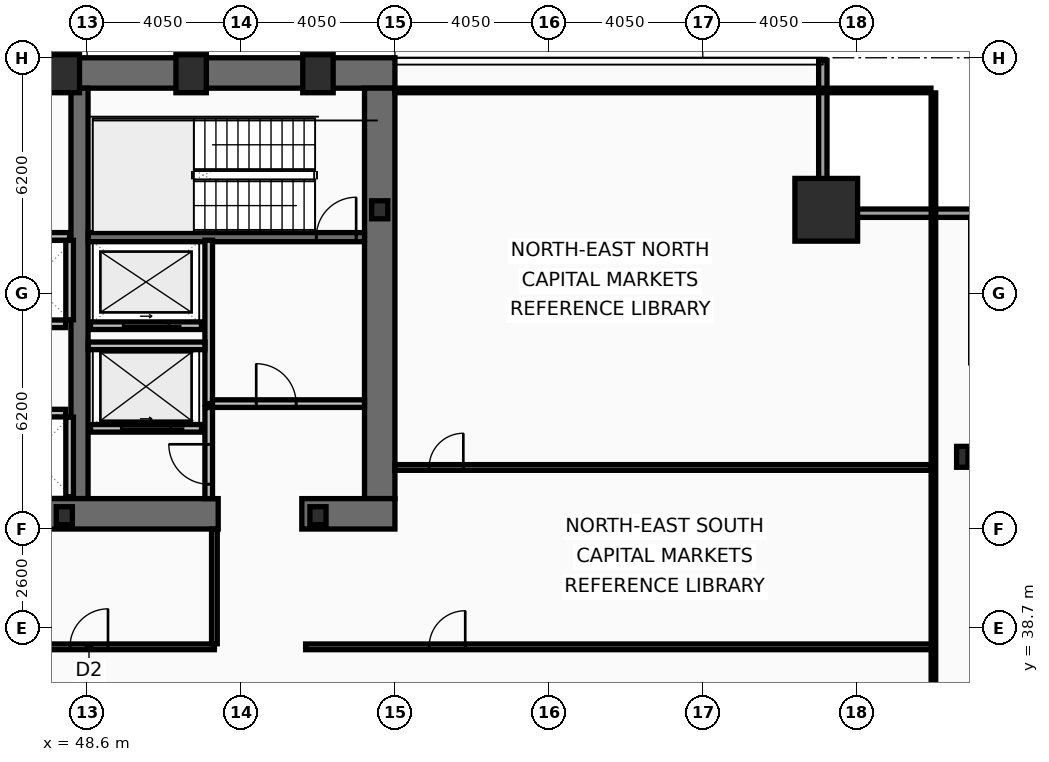
"""IFC4 building model, lengths in metres.
Left out: names, types, materials, properties, quantities, classifications, styles, units other than length and angle.
Written with IfcOpenShell. Run it as: python <this file> out.ifc"""

import sys

from ifc_helpers import new_model, si_unit, direction, frame, frame_2d, origin, origin_2d, place, context, subcontext, project, spatial, rectangle, hollow_rectangle, i_section, extrude, element, fill, save


model = new_model("IFC4")
c1 = context("Model", 3, precision=1e-05, world=origin(), true_north=direction((0.0, 1.0)))
c2 = subcontext(c1, "Body", "Model", "MODEL_VIEW")
j1 = project(units=[si_unit("LENGTHUNIT", "METRE"), si_unit("PLANEANGLEUNIT", "RADIAN")], contexts=[c1])
p1 = place(None, origin())
s1 = spatial("IfcSite", under=j1, at=p1, CompositionType="ELEMENT")
p2 = place(p1, origin())
s2 = spatial("IfcBuilding", under=s1, at=p2, CompositionType="ELEMENT")
p3 = place(p2, frame((0.0, 0.0, 57.8)))
s3 = spatial("IfcBuildingStorey", under=s2, at=p3, CompositionType="ELEMENT", Elevation=57.8)
p4 = place(p3, frame((16.2, 53.3, 0.0), z_axis=(0.0, 0.0, 1.0), x_axis=(1.0, 0.0, 0.0)))
e1 = element("IfcWall", 1, at=p4, inside=s3, PredefinedType="SHEAR", context=c2, shape_type="SweptSolid", body=[
    extrude(rectangle(XDim=40.5, YDim=0.8, at=frame_2d((20.25, 0.0))), origin(), (0.0, 0.0, 1.0), 3.82),
])
p5 = place(p3, frame((56.3, 52.9, 0.0), z_axis=(0.0, 0.0, 1.0), x_axis=(0.0, -1.0, 0.0)))
e2 = element("IfcWall", 2, at=p5, inside=s3, PredefinedType="SHEAR", context=c2, shape_type="SweptSolid", body=[
    extrude(rectangle(XDim=10.8, YDim=0.8, at=frame_2d((5.4, 0.0))), origin(), (0.0, 0.0, 1.0), 3.82),
])
p6 = place(p3, frame((48.4, 42.1, 0.0), z_axis=(0.0, 0.0, 1.0), x_axis=(0.0, 1.0, 0.0)))
e3 = element("IfcWall", 3, at=p6, inside=s3, PredefinedType="SHEAR", context=c2, shape_type="SweptSolid", body=[
    extrude(rectangle(XDim=10.8, YDim=0.45, at=frame_2d((5.4, 0.0))), origin(), (0.0, 0.0, 1.0), 3.82),
])
p7 = place(p3, frame((52.05, 41.7, 0.0), z_axis=(0.0, 0.0, 1.0), x_axis=(-1.0, 0.0, 0.0)))
e4 = element("IfcWall", 4, at=p7, inside=s3, PredefinedType="SHEAR", context=c2, shape_type="SweptSolid", body=[
    extrude(rectangle(XDim=11.3, YDim=0.8, at=frame_2d((5.65, 0.0))), origin(), (0.0, 0.0, 1.0), 3.82),
])
p8 = place(p3, frame((56.7, 41.7, 0.0), z_axis=(0.0, 0.0, 1.0), x_axis=(-1.0, 0.0, 0.0)))
e5 = element("IfcWall", 5, at=p8, inside=s3, PredefinedType="SHEAR", context=c2, shape_type="SweptSolid", body=[
    extrude(rectangle(XDim=2.45, YDim=0.8, at=frame_2d((1.225, 0.0))), origin(), (0.0, 0.0, 1.0), 3.82),
])
p9 = place(p3, frame((48.63, 48.98, 0.0), z_axis=(0.0, 0.0, 1.0), x_axis=(1.0, 0.0, 0.0)))
e6 = element("IfcWall", 6, at=p9, inside=s3, PredefinedType="SHEAR", context=c2, shape_type="SweptSolid", body=[
    extrude(rectangle(XDim=7.27, YDim=0.24, at=frame_2d((3.635, 0.0))), origin(), (0.0, 0.0, 1.0), 3.82),
])
p10 = place(p9, frame((6.0, 0.0, 0.0)))
e7 = element("IfcOpeningElement", 7, at=p10, cuts=e6, PredefinedType="OPENING", context=c2, shape_type="SweptSolid", body=[
    extrude(rectangle(XDim=1.05, YDim=2.15, at=frame_2d((0.525, 1.075))), frame((0.0, 0.13, 0.0), z_axis=(0.0, -1.0, 0.0), x_axis=(1.0, 0.0, 0.0)), (0.0, 0.0, 1.0), 0.26),
])
p11 = place(p3, frame((68.05, 49.7, 0.0), z_axis=(0.0, 0.0, 1.0), x_axis=(1.0, 0.0, 0.0)))
e8 = element("IfcColumn", 8, at=p11, inside=s3, PredefinedType="COLUMN", context=c2, shape_type="SweptSolid", body=[
    extrude(hollow_rectangle(XDim=1.65, YDim=1.65, WallThickness=0.075, at=origin_2d()), origin(), (0.0, 0.0, 1.0), 4.0),
])
for number, where, z_axis, x_axis in (
    (9, (48.0, 53.28, 0.0), (0.0, 0.0, 1.0), (1.0, 0.0, 0.0)),
    (10, (51.337, 53.28, 0.0), (0.0, 0.0, 1.0), (1.0, 0.0, 0.0)),
    (11, (54.675, 53.28, 0.0), (0.0, 0.0, 1.0), (1.0, 0.0, 0.0)),
):
    element("IfcColumn", number, at=place(p3, frame(where, z_axis=z_axis, x_axis=x_axis)), inside=s3, PredefinedType="COLUMN", context=c2, shape_type="SweptSolid", body=[
        extrude(hollow_rectangle(XDim=0.8, YDim=1.0, WallThickness=0.055, at=origin_2d()), origin(), (0.0, 0.0, 1.0), 4.0),
    ])
p12 = place(p3, frame((71.63, 43.2, 0.0), z_axis=(0.0, 0.0, 1.0), x_axis=(1.0, 0.0, 0.0)))
e12 = element("IfcColumn", 12, at=p12, inside=s3, PredefinedType="COLUMN", context=c2, shape_type="SweptSolid", body=[
    extrude(i_section(OverallWidth=0.3, OverallDepth=0.55, WebThickness=0.015, FlangeThickness=0.029, at=origin_2d()), origin(), (0.0, 0.0, 1.0), 4.0),
])
for number, where, z_axis, x_axis in (
    (13, (56.3, 49.7, 0.0), (0.0, 0.0, 1.0), (1.0, 0.0, 0.0)),
    (14, (48.0, 41.65, 0.0), (0.0, 0.0, 1.0), (1.0, 0.0, 0.0)),
    (15, (54.675, 41.65, 0.0), (0.0, 0.0, 1.0), (1.0, 0.0, 0.0)),
):
    element("IfcColumn", number, at=place(p3, frame(where, z_axis=z_axis, x_axis=x_axis)), inside=s3, PredefinedType="COLUMN", context=c2, shape_type="SweptSolid", body=[
        extrude(i_section(OverallWidth=0.424, OverallDepth=0.474, WebThickness=0.048, FlangeThickness=0.077, at=origin_2d()), origin(), (0.0, 0.0, 1.0), 4.0),
    ])
p13 = place(p3, frame((67.96, 53.63, 0.0), z_axis=(0.0, 0.0, 1.0), x_axis=(0.0, -1.0, 0.0)))
e16 = element("IfcWall", 16, at=p13, inside=s3, PredefinedType="SOLIDWALL", context=c2, shape_type="SweptSolid", body=[
    extrude(rectangle(XDim=3.91, YDim=0.22, at=frame_2d((1.955, 0.0))), origin(), (0.0, 0.0, 1.0), 3.16),
])
p14 = place(p3, frame((67.85, 49.61, 0.0), z_axis=(0.0, 0.0, 1.0), x_axis=(1.0, 0.0, 0.0)))
e17 = element("IfcWall", 17, at=p14, inside=s3, PredefinedType="SOLIDWALL", context=c2, shape_type="SweptSolid", body=[
    extrude(rectangle(XDim=4.22, YDim=0.22, at=frame_2d((2.11, 0.0))), origin(), (0.0, 0.0, 1.0), 3.16),
])
p15 = place(p3, frame((51.61, 43.95, 0.0), z_axis=(0.0, 0.0, 1.0), x_axis=(-1.0, 0.0, 0.0)))
e18 = element("IfcWall", 18, at=p15, inside=s3, PredefinedType="PARTITIONING", context=c2, shape_type="SweptSolid", body=[
    extrude(rectangle(XDim=2.92, YDim=0.2, at=frame_2d((1.46, 0.0))), origin(), (0.0, 0.0, 1.0), 3.82),
])
p16 = place(p15, frame((0.81, 0.0, 0.0)))
e19 = element("IfcOpeningElement", 19, at=p16, cuts=e18, PredefinedType="OPENING", context=c2, shape_type="SweptSolid", body=[
    extrude(rectangle(XDim=1.3, YDim=2.18, at=frame_2d((0.65, 1.09))), frame((0.0, 0.11, 0.0), z_axis=(0.0, -1.0, 0.0), x_axis=(1.0, 0.0, 0.0)), (0.0, 0.0, 1.0), 0.22),
])
p17 = place(p3, frame((51.61, 46.65, 0.0), z_axis=(0.0, 0.0, 1.0), x_axis=(-1.0, 0.0, 0.0)))
e20 = element("IfcWall", 20, at=p17, inside=s3, PredefinedType="PARTITIONING", context=c2, shape_type="SweptSolid", body=[
    extrude(rectangle(XDim=2.92, YDim=0.2, at=frame_2d((1.46, 0.0))), origin(), (0.0, 0.0, 1.0), 3.82),
])
p18 = place(p17, frame((0.86, 0.0, 0.0)))
e21 = element("IfcOpeningElement", 21, at=p18, cuts=e20, PredefinedType="OPENING", context=c2, shape_type="SweptSolid", body=[
    extrude(rectangle(XDim=1.2, YDim=2.18, at=frame_2d((0.6, 1.09))), frame((0.0, 0.11, 0.0), z_axis=(0.0, -1.0, 0.0), x_axis=(1.0, 0.0, 0.0)), (0.0, 0.0, 1.0), 0.22),
])
p19 = place(p3, frame((51.8, 44.6, 0.0), z_axis=(0.0, 0.0, 1.0), x_axis=(0.0, 1.0, 0.0)))
e22 = element("IfcWall", 22, at=p19, inside=s3, PredefinedType="PARTITIONING", context=c2, shape_type="SweptSolid", body=[
    extrude(rectangle(XDim=4.3, YDim=0.2, at=frame_2d((2.15, 0.0))), origin(), (0.0, 0.0, 1.0), 3.82),
])
p20 = place(p3, frame((51.9, 44.6, 0.0), z_axis=(0.0, 0.0, 1.0), x_axis=(1.0, 0.0, 0.0)))
e23 = element("IfcWall", 23, at=p20, inside=s3, PredefinedType="PARTITIONING", context=c2, shape_type="SweptSolid", body=[
    extrude(rectangle(XDim=4.0, YDim=0.2, at=frame_2d((2.0, 0.0))), origin(), (0.0, 0.0, 1.0), 3.82),
])
p21 = place(p20, frame((1.15, 0.0, 0.0)))
e24 = element("IfcOpeningElement", 24, at=p21, cuts=e23, PredefinedType="OPENING", context=c2, shape_type="SweptSolid", body=[
    extrude(rectangle(XDim=1.05, YDim=2.15, at=frame_2d((0.525, 1.075))), frame((0.0, 0.11, 0.0), z_axis=(0.0, -1.0, 0.0), x_axis=(1.0, 0.0, 0.0)), (0.0, 0.0, 1.0), 0.22),
])
p22 = place(p3, frame((48.63, 46.12, 0.0), z_axis=(0.0, 0.0, 1.0), x_axis=(1.0, 0.0, 0.0)))
e25 = element("IfcWall", 25, at=p22, inside=s3, PredefinedType="PARTITIONING", context=c2, shape_type="SweptSolid", body=[
    extrude(rectangle(XDim=3.07, YDim=0.2, at=frame_2d((1.535, 0.0))), origin(), (0.0, 0.0, 1.0), 3.82),
])
p23 = place(p3, frame((51.8, 42.1, 0.0), z_axis=(0.0, 0.0, 1.0), x_axis=(0.0, 1.0, 0.0)))
e26 = element("IfcWall", 26, at=p23, inside=s3, PredefinedType="PARTITIONING", context=c2, shape_type="SweptSolid", body=[
    extrude(rectangle(XDim=2.395, YDim=0.2, at=frame_2d((1.198, 0.0))), origin(), (0.0, 0.0, 1.0), 3.82),
])
p24 = place(p23, frame((0.38, 0.0, 0.0)))
e27 = element("IfcOpeningElement", 27, at=p24, cuts=e26, PredefinedType="OPENING", context=c2, shape_type="SweptSolid", body=[
    extrude(rectangle(XDim=1.05, YDim=2.15, at=frame_2d((0.525, 1.075))), frame((0.0, 0.11, 0.0), z_axis=(0.0, -1.0, 0.0), x_axis=(1.0, 0.0, 0.0)), (0.0, 0.0, 1.0), 0.22),
])
p25 = place(p3, frame((41.825, 46.7, 0.0), z_axis=(0.0, 0.0, 1.0), x_axis=(1.0, 0.0, 0.0)))
e28 = element("IfcWall", 28, at=p25, inside=s3, PredefinedType="PARTITIONING", context=c2, shape_type="SweptSolid", body=[
    extrude(rectangle(XDim=6.21, YDim=0.2, at=frame_2d((3.105, 0.0))), origin(), (0.0, 0.0, 1.0), 3.82),
])
p26 = place(p3, frame((48.14, 46.805, 0.0), z_axis=(0.0, 0.0, 1.0), x_axis=(0.0, 1.0, 0.0)))
e29 = element("IfcWall", 29, at=p26, inside=s3, PredefinedType="PARTITIONING", context=c2, shape_type="SweptSolid", body=[
    extrude(rectangle(XDim=2.09, YDim=0.2, at=frame_2d((1.045, 0.0))), origin(), (0.0, 0.0, 1.0), 3.82),
])
p27 = place(p3, frame((41.825, 44.35, 0.0), z_axis=(0.0, 0.0, 1.0), x_axis=(1.0, 0.0, 0.0)))
e30 = element("IfcWall", 30, at=p27, inside=s3, PredefinedType="PARTITIONING", context=c2, shape_type="SweptSolid", body=[
    extrude(rectangle(XDim=6.21, YDim=0.2, at=frame_2d((3.105, 0.0))), origin(), (0.0, 0.0, 1.0), 3.82),
])
p28 = place(p3, frame((48.14, 42.15, 0.0), z_axis=(0.0, 0.0, 1.0), x_axis=(0.0, 1.0, 0.0)))
e31 = element("IfcWall", 31, at=p28, inside=s3, PredefinedType="PARTITIONING", context=c2, shape_type="SweptSolid", body=[
    extrude(rectangle(XDim=2.095, YDim=0.2, at=frame_2d((1.048, 0.0))), origin(), (0.0, 0.0, 1.0), 3.82),
])
p29 = place(p3, frame((40.58, 52.86, 0.0), z_axis=(0.0, 0.0, 1.0), x_axis=(1.0, 0.0, 0.0)))
e32 = element("IfcWall", 32, at=p29, inside=s3, PredefinedType="PARTITIONING", context=c2, shape_type="SweptSolid", body=[
    extrude(rectangle(XDim=7.56, YDim=0.12, at=frame_2d((3.78, 0.0))), origin(), (0.0, 0.0, 1.0), 3.82),
])
p30 = place(p3, frame((40.58, 49.0, 0.0), z_axis=(0.0, 0.0, 1.0), x_axis=(1.0, 0.0, 0.0)))
e33 = element("IfcWall", 33, at=p30, inside=s3, PredefinedType="PARTITIONING", context=c2, shape_type="SweptSolid", body=[
    extrude(rectangle(XDim=7.56, YDim=0.2, at=frame_2d((3.78, 0.0))), origin(), (0.0, 0.0, 1.0), 3.82),
])
p31 = place(p30, frame((0.16, 0.0, 0.0)))
e34 = element("IfcOpeningElement", 34, at=p31, cuts=e33, PredefinedType="OPENING", context=c2, shape_type="SweptSolid", body=[
    extrude(rectangle(XDim=0.95, YDim=2.1, at=frame_2d((0.475, 1.05))), frame((0.0, 0.11, 0.0), z_axis=(0.0, -1.0, 0.0), x_axis=(1.0, 0.0, 0.0)), (0.0, 0.0, 1.0), 0.22),
])
p32 = place(p3, frame((47.05, 38.2, 0.0), z_axis=(0.0, 0.0, 1.0), x_axis=(1.0, 0.0, 0.0)))
e35 = element("IfcWall", 35, at=p32, inside=s3, PredefinedType="PARTITIONING", context=c2, shape_type="SweptSolid", body=[
    extrude(rectangle(XDim=4.9, YDim=0.15, at=frame_2d((2.45, 0.0))), origin(), (0.0, 0.0, 1.0), 3.01),
])
p33 = place(p32, frame((1.1, 0.0, 0.0)))
e36 = element("IfcOpeningElement", 36, at=p33, cuts=e35, PredefinedType="OPENING", context=c2, shape_type="SweptSolid", body=[
    extrude(rectangle(XDim=1.0, YDim=2.05, at=frame_2d((0.5, 1.025))), frame((0.0, 0.085, 0.0), z_axis=(0.0, -1.0, 0.0), x_axis=(1.0, 0.0, 0.0)), (0.0, 0.0, 1.0), 0.17),
])
p34 = place(p3, frame((51.95, 38.28, 0.0), z_axis=(0.0, 0.0, 1.0), x_axis=(0.0, 1.0, 0.0)))
e37 = element("IfcWall", 37, at=p34, inside=s3, PredefinedType="PARTITIONING", context=c2, shape_type="SweptSolid", body=[
    extrude(rectangle(XDim=3.02, YDim=0.15, at=frame_2d((1.51, 0.0))), origin(), (0.0, 0.0, 1.0), 3.82),
])
p35 = place(p3, frame((54.35, 38.2, 0.0), z_axis=(0.0, 0.0, 1.0), x_axis=(1.0, 0.0, 0.0)))
e38 = element("IfcWall", 38, at=p35, inside=s3, PredefinedType="PARTITIONING", context=c2, shape_type="SweptSolid", body=[
    extrude(rectangle(XDim=16.52, YDim=0.15, at=frame_2d((8.26, 0.0))), origin(), (0.0, 0.0, 1.0), 3.01),
])
p36 = place(p35, frame((3.25, 0.0, 0.0)))
e39 = element("IfcOpeningElement", 39, at=p36, cuts=e38, PredefinedType="OPENING", context=c2, shape_type="SweptSolid", body=[
    extrude(rectangle(XDim=0.95, YDim=2.05, at=frame_2d((0.475, 1.025))), frame((0.0, 0.085, 0.0), z_axis=(0.0, -1.0, 0.0), x_axis=(1.0, 0.0, 0.0)), (0.0, 0.0, 1.0), 0.17),
])
p37 = place(p3, frame((56.7, 42.92, 0.0), z_axis=(0.0, 0.0, 1.0), x_axis=(1.0, 0.0, 0.0)))
e40 = element("IfcWall", 40, at=p37, inside=s3, PredefinedType="PARTITIONING", context=c2, shape_type="SweptSolid", body=[
    extrude(rectangle(XDim=14.105, YDim=0.15, at=frame_2d((7.052, 0.0))), origin(), (0.0, 0.0, 1.0), 3.01),
])
p38 = place(p37, frame((0.9, 0.0, 0.0)))
e41 = element("IfcOpeningElement", 41, at=p38, cuts=e40, PredefinedType="OPENING", context=c2, shape_type="SweptSolid", body=[
    extrude(rectangle(XDim=0.9, YDim=2.05, at=frame_2d((0.45, 1.025))), frame((0.0, 0.085, 0.0), z_axis=(0.0, -1.0, 0.0), x_axis=(1.0, 0.0, 0.0)), (0.0, 0.0, 1.0), 0.17),
])
p39 = place(p3, frame((70.87, 10.665, 0.0), z_axis=(0.0, 0.0, 1.0), x_axis=(0.0, 1.0, 0.0)))
e42 = element("IfcWall", 42, at=p39, inside=s3, PredefinedType="PARTITIONING", context=c2, shape_type="SweptSolid", body=[
    extrude(rectangle(XDim=42.11, YDim=0.12, at=frame_2d((21.055, 0.0))), origin(), (0.0, 0.0, 1.0), 3.01),
])
p40 = place(p3, frame((56.7, 52.84, 0.0), z_axis=(0.0, 0.0, 1.0), x_axis=(1.0, 0.0, 0.0)))
e43 = element("IfcWall", 43, at=p40, inside=s3, PredefinedType="PARTITIONING", context=c2, shape_type="SweptSolid", body=[
    extrude(rectangle(XDim=14.105, YDim=0.12, at=frame_2d((7.052, 0.0))), origin(), (0.0, 0.0, 1.0), 3.82),
])
p41 = place(p10, origin())
e44 = element("IfcDoor", 44, at=p41, inside=s3, OperationType="SINGLE_SWING_RIGHT", PredefinedType="DOOR", context=c2, shape_type="SweptSolid", body=[
    extrude(rectangle(XDim=1.05, YDim=2.15, at=frame_2d((0.525, 1.075))), frame((0.0, 0.025, 0.0), z_axis=(0.0, -1.0, 0.0), x_axis=(1.0, 0.0, 0.0)), (0.0, 0.0, 1.0), 0.05),
])
fill(e7, e44)
p42 = place(p16, origin())
e45 = element("IfcDoor", 45, at=p42, inside=s3, OperationType="SLIDING_TO_LEFT", PredefinedType="DOOR", context=c2, shape_type="SweptSolid", body=[
    extrude(rectangle(XDim=1.3, YDim=2.18, at=frame_2d((0.65, 1.09))), frame((0.0, 0.025, 0.0), z_axis=(0.0, -1.0, 0.0), x_axis=(1.0, 0.0, 0.0)), (0.0, 0.0, 1.0), 0.05),
])
fill(e19, e45)
p43 = place(p18, origin())
e46 = element("IfcDoor", 46, at=p43, inside=s3, OperationType="SLIDING_TO_LEFT", PredefinedType="DOOR", context=c2, shape_type="SweptSolid", body=[
    extrude(rectangle(XDim=1.2, YDim=2.18, at=frame_2d((0.6, 1.09))), frame((0.0, 0.025, 0.0), z_axis=(0.0, -1.0, 0.0), x_axis=(1.0, 0.0, 0.0)), (0.0, 0.0, 1.0), 0.05),
])
fill(e21, e46)
p44 = place(p21, origin())
e47 = element("IfcDoor", 47, at=p44, inside=s3, OperationType="SINGLE_SWING_LEFT", PredefinedType="DOOR", context=c2, shape_type="SweptSolid", body=[
    extrude(rectangle(XDim=1.05, YDim=2.15, at=frame_2d((0.525, 1.075))), frame((0.0, 0.025, 0.0), z_axis=(0.0, -1.0, 0.0), x_axis=(1.0, 0.0, 0.0)), (0.0, 0.0, 1.0), 0.05),
])
fill(e24, e47)
p45 = place(p24, origin())
e48 = element("IfcDoor", 48, at=p45, inside=s3, OperationType="SINGLE_SWING_RIGHT", PredefinedType="DOOR", context=c2, shape_type="SweptSolid", body=[
    extrude(rectangle(XDim=1.05, YDim=2.15, at=frame_2d((0.525, 1.075))), frame((0.0, 0.025, 0.0), z_axis=(0.0, -1.0, 0.0), x_axis=(1.0, 0.0, 0.0)), (0.0, 0.0, 1.0), 0.05),
])
fill(e27, e48)
p46 = place(p33, origin())
e49 = element("IfcDoor", 49, at=p46, inside=s3, OperationType="SINGLE_SWING_RIGHT", PredefinedType="DOOR", context=c2, shape_type="SweptSolid", body=[
    extrude(rectangle(XDim=1.0, YDim=2.05, at=frame_2d((0.5, 1.025))), frame((0.0, 0.025, 0.0), z_axis=(0.0, -1.0, 0.0), x_axis=(1.0, 0.0, 0.0)), (0.0, 0.0, 1.0), 0.05),
])
fill(e36, e49)
p47 = place(p36, origin())
e50 = element("IfcDoor", 50, at=p47, inside=s3, OperationType="SINGLE_SWING_RIGHT", PredefinedType="DOOR", context=c2, shape_type="SweptSolid", body=[
    extrude(rectangle(XDim=0.95, YDim=2.05, at=frame_2d((0.475, 1.025))), frame((0.0, 0.025, 0.0), z_axis=(0.0, -1.0, 0.0), x_axis=(1.0, 0.0, 0.0)), (0.0, 0.0, 1.0), 0.05),
])
fill(e39, e50)
p48 = place(p38, origin())
e51 = element("IfcDoor", 51, at=p48, inside=s3, OperationType="SINGLE_SWING_RIGHT", PredefinedType="DOOR", context=c2, shape_type="SweptSolid", body=[
    extrude(rectangle(XDim=0.9, YDim=2.05, at=frame_2d((0.45, 1.025))), frame((0.0, 0.025, 0.0), z_axis=(0.0, -1.0, 0.0), x_axis=(1.0, 0.0, 0.0)), (0.0, 0.0, 1.0), 0.05),
])
fill(e41, e51)
save(model, sys.argv[1])
